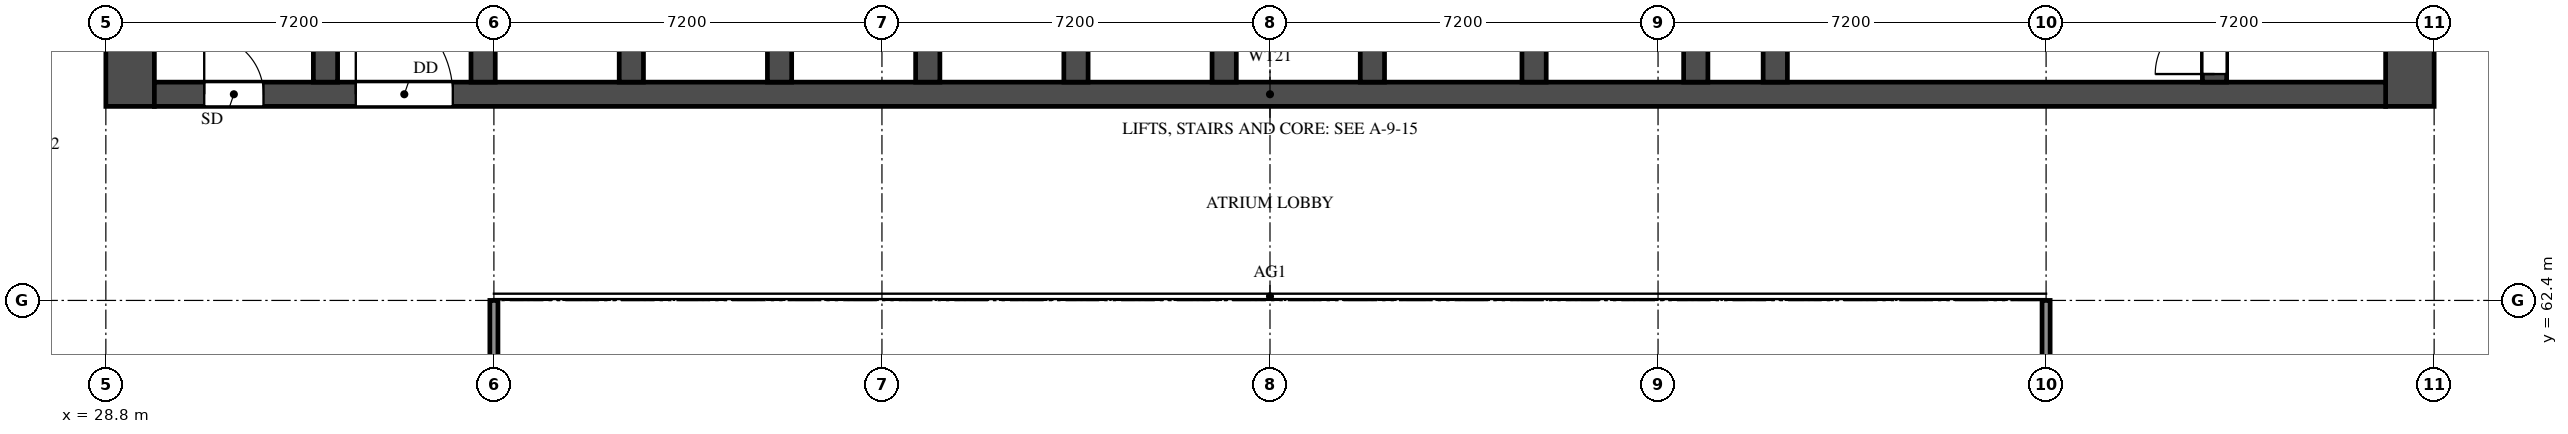
"""IFC4 building model, lengths in metres.
Left out: names, types, materials, properties, quantities, classifications, styles, units other than length and angle.
Written with IfcOpenShell. Run it as: python <this file> out.ifc"""

import sys

from ifc_helpers import new_model, si_unit, direction, frame, frame_2d, origin, place, context, subcontext, project, spatial, rectangle, extrude, element, fill, save


model = new_model("IFC4")
c1 = context("Model", 3, precision=1e-05, world=origin(), true_north=direction((0.0, 1.0)))
c2 = subcontext(c1, "Body", "Model", "MODEL_VIEW")
j1 = project(units=[si_unit("LENGTHUNIT", "METRE"), si_unit("PLANEANGLEUNIT", "RADIAN")], contexts=[c1])
p1 = place(None, origin())
s1 = spatial("IfcSite", under=j1, at=p1, CompositionType="ELEMENT")
p2 = place(p1, origin())
s2 = spatial("IfcBuilding", under=s1, at=p2, CompositionType="ELEMENT")
p3 = place(p2, frame((0.0, 0.0, 100.5)))
s3 = spatial("IfcBuildingStorey", under=s2, at=p3, CompositionType="ELEMENT", Elevation=100.5)
for number, where, z_axis, x_axis in (
    (1, (29.25, 66.0, 0.0), (0.0, 0.0, 1.0), (0.0, 1.0, 0.0)),
    (2, (71.55, 66.0, 0.0), (0.0, 0.0, 1.0), (0.0, 1.0, 0.0)),
):
    element("IfcWall", number, at=place(p3, frame(where, z_axis=z_axis, x_axis=x_axis)), inside=s3, PredefinedType="SHEAR", context=c2, shape_type="SweptSolid", body=[
        extrude(rectangle(XDim=12.0, YDim=0.9, at=frame_2d((6.0, 0.0))), origin(), (0.0, 0.0, 1.0), 3.18),
    ])
p4 = place(p3, frame((29.7, 66.225, 0.0), z_axis=(0.0, 0.0, 1.0), x_axis=(1.0, 0.0, 0.0)))
e3 = element("IfcWall", 3, at=p4, inside=s3, PredefinedType="SHEAR", context=c2, shape_type="SweptSolid", body=[
    extrude(rectangle(XDim=41.4, YDim=0.45, at=frame_2d((20.7, 0.0))), origin(), (0.0, 0.0, 1.0), 3.18),
])
p5 = place(p4, frame((0.925, 0.0, 0.0)))
e4 = element("IfcOpeningElement", 4, at=p5, cuts=e3, PredefinedType="OPENING", context=c2, shape_type="SweptSolid", body=[
    extrude(rectangle(XDim=1.1, YDim=2.1, at=frame_2d((0.55, 1.05))), frame((0.0, 0.235, 0.0), z_axis=(0.0, -1.0, 0.0), x_axis=(1.0, 0.0, 0.0)), (0.0, 0.0, 1.0), 0.47),
])
p6 = place(p4, frame((3.738, 0.0, 0.0)))
e5 = element("IfcOpeningElement", 5, at=p6, cuts=e3, PredefinedType="OPENING", context=c2, shape_type="SweptSolid", body=[
    extrude(rectangle(XDim=1.8, YDim=2.1, at=frame_2d((0.9, 1.05))), frame((0.0, 0.235, 0.0), z_axis=(0.0, -1.0, 0.0), x_axis=(1.0, 0.0, 0.0)), (0.0, 0.0, 1.0), 0.47),
])
p7 = place(p3, frame((32.875, 66.45, 0.0), z_axis=(0.0, 0.0, 1.0), x_axis=(0.0, 1.0, 0.0)))
e6 = element("IfcWall", 6, at=p7, inside=s3, PredefinedType="SHEAR", context=c2, shape_type="SweptSolid", body=[
    extrude(rectangle(XDim=10.65, YDim=0.45, at=frame_2d((5.325, 0.0))), origin(), (0.0, 0.0, 1.0), 3.18),
])
p8 = place(p3, frame((67.925, 66.45, 0.0), z_axis=(0.0, 0.0, 1.0), x_axis=(0.0, 1.0, 0.0)))
e7 = element("IfcWall", 7, at=p8, inside=s3, PredefinedType="SHEAR", context=c2, shape_type="SweptSolid", body=[
    extrude(rectangle(XDim=10.65, YDim=0.45, at=frame_2d((5.325, 0.0))), origin(), (0.0, 0.0, 1.0), 3.18),
])
p9 = place(p8, frame((0.15, 0.0, 0.0)))
e8 = element("IfcOpeningElement", 8, at=p9, cuts=e7, PredefinedType="OPENING", context=c2, shape_type="SweptSolid", body=[
    extrude(rectangle(XDim=1.1, YDim=2.1, at=frame_2d((0.55, 1.05))), frame((0.0, 0.235, 0.0), z_axis=(0.0, -1.0, 0.0), x_axis=(1.0, 0.0, 0.0)), (0.0, 0.0, 1.0), 0.47),
])
p10 = place(p3, frame((59.775, 66.45, 0.0), z_axis=(0.0, 0.0, 1.0), x_axis=(0.0, 1.0, 0.0)))
e9 = element("IfcWall", 9, at=p10, inside=s3, PredefinedType="SHEAR", context=c2, shape_type="SweptSolid", body=[
    extrude(rectangle(XDim=6.025, YDim=0.45, at=frame_2d((3.013, 0.0))), origin(), (0.0, 0.0, 1.0), 3.18),
])
p11 = place(p10, frame((3.85, 0.0, 0.0)))
e10 = element("IfcOpeningElement", 10, at=p11, cuts=e9, PredefinedType="OPENING", context=c2, shape_type="SweptSolid", body=[
    extrude(rectangle(XDim=1.2, YDim=2.1, at=frame_2d((0.6, 1.05))), frame((0.0, 0.235, 0.0), z_axis=(0.0, -1.0, 0.0), x_axis=(1.0, 0.0, 0.0)), (0.0, 0.0, 1.0), 0.47),
])
for number, where, z_axis, x_axis in (
    (11, (35.8, 66.45, 0.0), (0.0, 0.0, 1.0), (0.0, 1.0, 0.0)),
    (12, (38.55, 66.45, 0.0), (0.0, 0.0, 1.0), (0.0, 1.0, 0.0)),
    (13, (41.3, 66.45, 0.0), (0.0, 0.0, 1.0), (0.0, 1.0, 0.0)),
    (14, (44.05, 66.45, 0.0), (0.0, 0.0, 1.0), (0.0, 1.0, 0.0)),
    (15, (46.8, 66.45, 0.0), (0.0, 0.0, 1.0), (0.0, 1.0, 0.0)),
    (16, (49.55, 66.45, 0.0), (0.0, 0.0, 1.0), (0.0, 1.0, 0.0)),
    (17, (52.3, 66.45, 0.0), (0.0, 0.0, 1.0), (0.0, 1.0, 0.0)),
    (18, (55.3, 66.45, 0.0), (0.0, 0.0, 1.0), (0.0, 1.0, 0.0)),
    (19, (58.3, 66.45, 0.0), (0.0, 0.0, 1.0), (0.0, 1.0, 0.0)),
):
    element("IfcWall", number, at=place(p3, frame(where, z_axis=z_axis, x_axis=x_axis)), inside=s3, PredefinedType="SHEAR", context=c2, shape_type="SweptSolid", body=[
        extrude(rectangle(XDim=2.425, YDim=0.45, at=frame_2d((1.212, 0.0))), origin(), (0.0, 0.0, 1.0), 3.18),
    ])
for number, where, z_axis, x_axis in (
    (20, (36.0, 48.0, 0.0), (0.0, 0.0, 1.0), (0.0, 1.0, 0.0)),
    (21, (64.8, 48.0, 0.0), (0.0, 0.0, 1.0), (0.0, 1.0, 0.0)),
):
    element("IfcWall", number, at=place(p3, frame(where, z_axis=z_axis, x_axis=x_axis)), inside=s3, PredefinedType="SOLIDWALL", context=c2, shape_type="SweptSolid", body=[
        extrude(rectangle(XDim=14.4, YDim=0.15, at=frame_2d((7.2, 0.0))), origin(), (0.0, 0.0, 1.0), 2.28),
    ])
p12 = place(p5, origin())
e22 = element("IfcDoor", 22, at=p12, inside=s3, OperationType="SINGLE_SWING_LEFT", PredefinedType="DOOR", context=c2, shape_type="SweptSolid", body=[
    extrude(rectangle(XDim=1.1, YDim=2.1, at=frame_2d((0.55, 1.05))), frame((0.0, 0.025, 0.0), z_axis=(0.0, -1.0, 0.0), x_axis=(1.0, 0.0, 0.0)), (0.0, 0.0, 1.0), 0.05),
])
fill(e4, e22)
p13 = place(p9, origin())
e23 = element("IfcDoor", 23, at=p13, inside=s3, OperationType="SINGLE_SWING_LEFT", PredefinedType="DOOR", context=c2, shape_type="SweptSolid", body=[
    extrude(rectangle(XDim=1.1, YDim=2.1, at=frame_2d((0.55, 1.05))), frame((0.0, 0.025, 0.0), z_axis=(0.0, -1.0, 0.0), x_axis=(1.0, 0.0, 0.0)), (0.0, 0.0, 1.0), 0.05),
])
fill(e8, e23)
p14 = place(p6, origin())
e24 = element("IfcDoor", 24, at=p14, inside=s3, OperationType="DOUBLE_DOOR_SINGLE_SWING", PredefinedType="DOOR", context=c2, shape_type="SweptSolid", body=[
    extrude(rectangle(XDim=1.8, YDim=2.1, at=frame_2d((0.9, 1.05))), frame((0.0, 0.025, 0.0), z_axis=(0.0, -1.0, 0.0), x_axis=(1.0, 0.0, 0.0)), (0.0, 0.0, 1.0), 0.05),
])
fill(e5, e24)
save(model, sys.argv[1])
